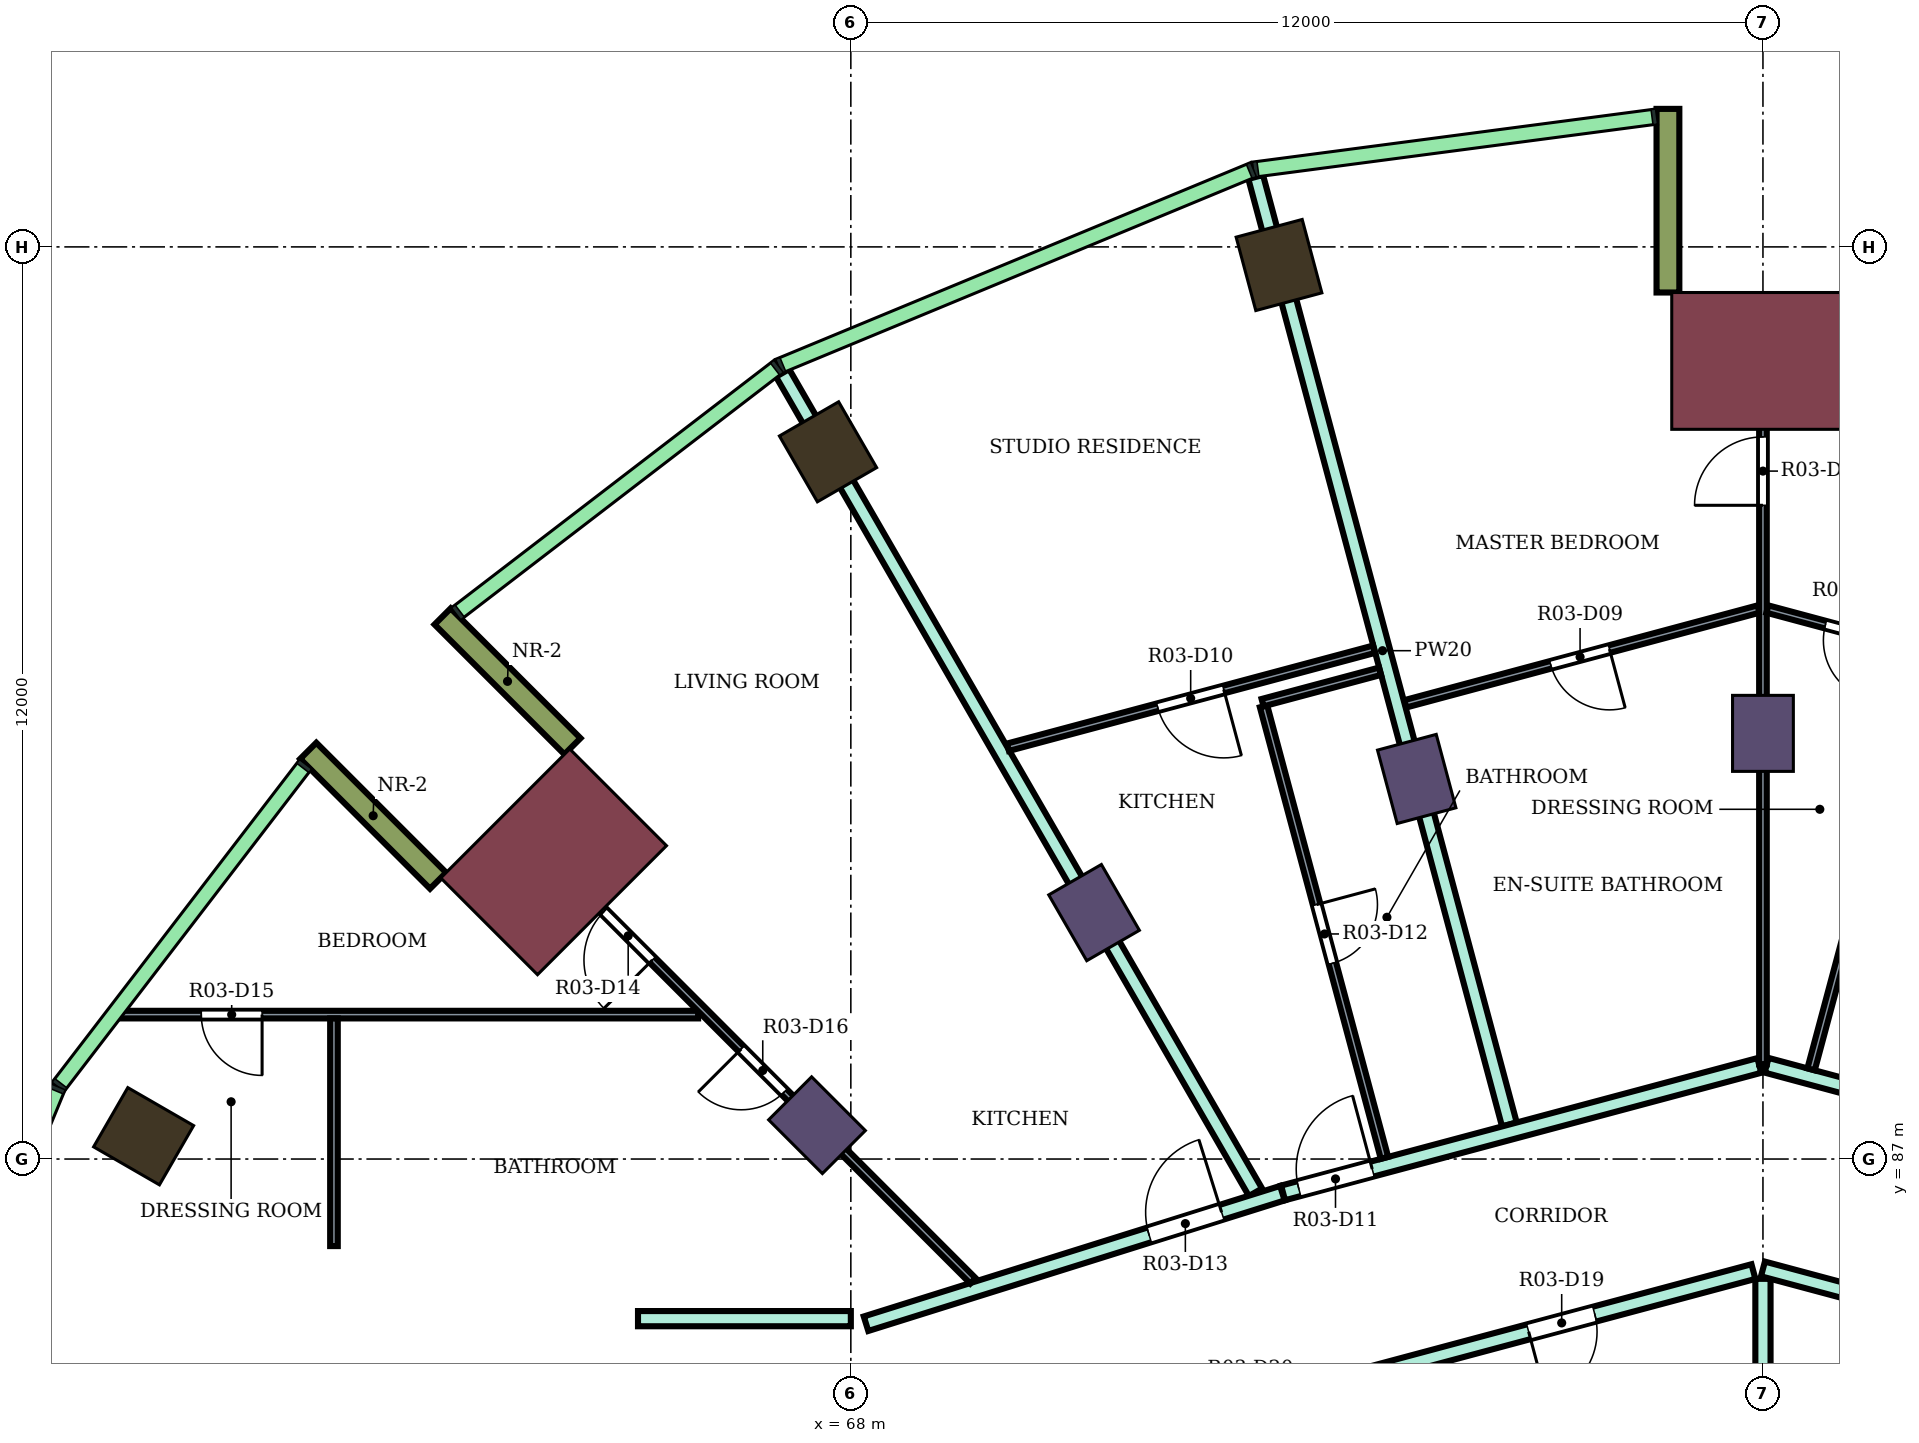
"""IFC4 building model, lengths in metres.
Left out: names, types, materials, properties, quantities, classifications, styles, units other than length and angle.
Written with IfcOpenShell. Run it as: python <this file> out.ifc"""

import sys

from ifc_helpers import new_model, si_unit, direction, frame, frame_2d, origin, origin_2d, place, context, subcontext, project, spatial, rectangle, extrude, element, fill, save


model = new_model("IFC4")
c1 = context("Model", 3, precision=1e-05, world=origin(), true_north=direction((0.0, 1.0)))
c2 = subcontext(c1, "Body", "Model", "MODEL_VIEW")
j1 = project(units=[si_unit("LENGTHUNIT", "METRE"), si_unit("PLANEANGLEUNIT", "RADIAN")], contexts=[c1])
p1 = place(None, origin())
s1 = spatial("IfcSite", under=j1, at=p1, CompositionType="ELEMENT")
p2 = place(p1, origin())
s2 = spatial("IfcBuilding", under=s1, at=p2, CompositionType="ELEMENT")
p3 = place(p2, frame((0.0, 0.0, 190.5)))
s3 = spatial("IfcBuildingStorey", under=s2, at=p3, CompositionType="ELEMENT", Elevation=190.5)
for number, where, z_axis, x_axis in (
    (1, (73.633, 98.762, 0.0), (0.0, 0.0, 1.0), (-0.259, 0.966, 0.0)),
    (2, (67.7, 96.304, 0.0), (0.0, 0.0, 1.0), (-0.5, 0.866, 0.0)),
    (3, (58.696, 87.3, 0.0), (0.0, 0.0, 1.0), (-0.866, 0.5, 0.0)),
):
    element("IfcColumn", number, at=place(p3, frame(where, z_axis=z_axis, x_axis=x_axis)), inside=s3, PredefinedType="COLUMN", context=c2, shape_type="SweptSolid", body=[
        extrude(rectangle(XDim=1.0, YDim=0.9, at=origin_2d()), origin(), (0.0, 0.0, 1.0), 4.1),
    ])
for number, where, z_axis, x_axis in (
    (4, (80.0, 92.6, 0.0), (0.0, 0.0, 1.0), (0.0, 1.0, 0.0)),
    (5, (75.445, 92.0, 0.0), (0.0, 0.0, 1.0), (-0.259, 0.966, 0.0)),
    (6, (71.2, 90.242, 0.0), (0.0, 0.0, 1.0), (-0.5, 0.866, 0.0)),
    (7, (67.555, 87.445, 0.0), (0.0, 0.0, 1.0), (-0.707, 0.707, 0.0)),
):
    element("IfcColumn", number, at=place(p3, frame(where, z_axis=z_axis, x_axis=x_axis)), inside=s3, PredefinedType="COLUMN", context=c2, shape_type="SweptSolid", body=[
        extrude(rectangle(XDim=1.0, YDim=0.8, at=origin_2d()), origin(), (0.0, 0.0, 1.0), 4.1),
    ])
for number, where, z_axis, x_axis in (
    (8, (80.0, 97.5, 0.0), (0.0, 0.0, 1.0), (0.0, 1.0, 0.0)),
    (9, (64.09, 90.91, 0.0), (0.0, 0.0, 1.0), (-0.707, 0.707, 0.0)),
):
    element("IfcColumn", number, at=place(p3, frame(where, z_axis=z_axis, x_axis=x_axis)), inside=s3, PredefinedType="COLUMN", context=c2, shape_type="SweptSolid", body=[
        extrude(rectangle(XDim=1.8, YDim=2.4, at=origin_2d()), origin(), (0.0, 0.0, 1.0), 4.1),
    ])
for number, where, z_axis, x_axis in (
    (10, (78.75, 98.4, 0.0), (0.0, 0.0, 1.0), (0.0, 1.0, 0.0)),
    (11, (64.338, 92.43, 0.0), (0.0, 0.0, 1.0), (-0.707, 0.707, 0.0)),
    (12, (62.57, 90.662, 0.0), (0.0, 0.0, 1.0), (-0.707, 0.707, 0.0)),
):
    element("IfcWall", number, at=place(p3, frame(where, z_axis=z_axis, x_axis=x_axis)), inside=s3, PredefinedType="NOTDEFINED", context=c2, shape_type="SweptSolid", body=[
        extrude(rectangle(XDim=2.416, YDim=0.3, at=frame_2d((1.208, 0.0))), origin(), (0.0, 0.0, 1.0), 4.1),
    ])
p4 = place(p3, frame((65.2, 84.9, 0.0), z_axis=(0.0, 0.0, 1.0), x_axis=(1.0, 0.0, 0.0)))
e13 = element("IfcWall", 13, at=p4, inside=s3, PredefinedType="PARTITIONING", context=c2, shape_type="SweptSolid", body=[
    extrude(rectangle(XDim=2.8, YDim=0.2, at=frame_2d((1.4, 0.0))), origin(), (0.0, 0.0, 1.0), 3.65),
])
p5 = place(p3, frame((67.102, 97.342, 0.0), z_axis=(0.0, 0.0, 1.0), x_axis=(0.499940938316, -0.866059500378, 0.0)))
e14 = element("IfcWall", 14, at=p5, inside=s3, PredefinedType="PARTITIONING", context=c2, shape_type="SweptSolid", body=[
    extrude(rectangle(XDim=12.446, YDim=0.2, at=frame_2d((6.223, 0.0))), origin(), (0.0, 0.0, 1.0), 3.65),
])
p6 = place(p3, frame((68.2, 84.833, 0.0), z_axis=(0.0, 0.0, 1.0), x_axis=(0.954204109499, 0.299156342762, 0.0)))
e15 = element("IfcWall", 15, at=p6, inside=s3, PredefinedType="PARTITIONING", context=c2, shape_type="SweptSolid", body=[
    extrude(rectangle(XDim=5.74, YDim=0.2, at=frame_2d((2.87, 0.0))), origin(), (0.0, 0.0, 1.0), 3.65),
])
p7 = place(p6, frame((3.903, 0.0, 0.0)))
e16 = element("IfcOpeningElement", 16, at=p7, cuts=e15, PredefinedType="OPENING", context=c2, shape_type="SweptSolid", body=[
    extrude(rectangle(XDim=1.0, YDim=2.1, at=frame_2d((0.5, 1.05))), frame((0.0, 0.11, 0.0), z_axis=(0.0, -1.0, 0.0), x_axis=(1.0, 0.0, 0.0)), (0.0, 0.0, 1.0), 0.22),
])
p8 = place(p3, frame((73.326, 99.92, 0.0), z_axis=(0.0, 0.0, 1.0), x_axis=(0.258652861824, -0.965970339643, 0.0)))
e17 = element("IfcWall", 17, at=p8, inside=s3, PredefinedType="PARTITIONING", context=c2, shape_type="SweptSolid", body=[
    extrude(rectangle(XDim=12.904, YDim=0.2, at=frame_2d((6.452, 0.0))), origin(), (0.0, 0.0, 1.0), 3.65),
])
p9 = place(p3, frame((73.687, 86.554, 0.0), z_axis=(0.0, 0.0, 1.0), x_axis=(0.965992724769, 0.258569247387, 0.0)))
e18 = element("IfcWall", 18, at=p9, inside=s3, PredefinedType="PARTITIONING", context=c2, shape_type="SweptSolid", body=[
    extrude(rectangle(XDim=6.486, YDim=0.2, at=frame_2d((3.243, 0.0))), origin(), (0.0, 0.0, 1.0), 3.65),
])
p10 = place(p9, frame((0.214, 0.0, 0.0)))
e19 = element("IfcOpeningElement", 19, at=p10, cuts=e18, PredefinedType="OPENING", context=c2, shape_type="SweptSolid", body=[
    extrude(rectangle(XDim=1.0, YDim=2.1, at=frame_2d((0.5, 1.05))), frame((0.0, 0.11, 0.0), z_axis=(0.0, -1.0, 0.0), x_axis=(1.0, 0.0, 0.0)), (0.0, 0.0, 1.0), 0.22),
])
p11 = place(p3, frame((74.413, 84.057, 0.0), z_axis=(0.0, 0.0, 1.0), x_axis=(0.965972135939, 0.258646153246, 0.0)))
e20 = element("IfcWall", 20, at=p11, inside=s3, PredefinedType="PARTITIONING", context=c2, shape_type="SweptSolid", body=[
    extrude(rectangle(XDim=5.654, YDim=0.2, at=frame_2d((2.827, 0.0))), origin(), (0.0, 0.0, 1.0), 3.65),
])
p12 = place(p11, frame((2.593, 0.0, 0.0)))
e21 = element("IfcOpeningElement", 21, at=p12, cuts=e20, PredefinedType="OPENING", context=c2, shape_type="SweptSolid", body=[
    extrude(rectangle(XDim=0.9, YDim=2.1, at=frame_2d((0.45, 1.05))), frame((0.0, 0.11, 0.0), z_axis=(0.0, -1.0, 0.0), x_axis=(1.0, 0.0, 0.0)), (0.0, 0.0, 1.0), 0.22),
])
p13 = place(p3, frame((80.0, 82.699, 0.0), z_axis=(0.0, 0.0, 1.0), x_axis=(0.0, 1.0, 0.0)))
e22 = element("IfcWall", 22, at=p13, inside=s3, PredefinedType="PARTITIONING", context=c2, shape_type="SweptSolid", body=[
    extrude(rectangle(XDim=2.725, YDim=0.2, at=frame_2d((1.363, 0.0))), origin(), (0.0, 0.0, 1.0), 3.65),
])
p14 = place(p3, frame((80.0, 85.554, 0.0), z_axis=(0.0, 0.0, 1.0), x_axis=(0.965928989968, -0.258807237802, 0.0)))
e23 = element("IfcWall", 23, at=p14, inside=s3, PredefinedType="PARTITIONING", context=c2, shape_type="SweptSolid", body=[
    extrude(rectangle(XDim=5.774, YDim=0.2, at=frame_2d((2.887, 0.0))), origin(), (0.0, 0.0, 1.0), 3.65),
])
p15 = place(p14, frame((2.292, 0.0, 0.0)))
e24 = element("IfcOpeningElement", 24, at=p15, cuts=e23, PredefinedType="OPENING", context=c2, shape_type="SweptSolid", body=[
    extrude(rectangle(XDim=0.9, YDim=2.1, at=frame_2d((0.45, 1.05))), frame((0.0, 0.11, 0.0), z_axis=(0.0, -1.0, 0.0), x_axis=(1.0, 0.0, 0.0)), (0.0, 0.0, 1.0), 0.22),
])
p16 = place(p3, frame((80.048, 88.233, 0.0), z_axis=(0.0, 0.0, 1.0), x_axis=(0.965787353661, -0.259335280109, 0.0)))
e25 = element("IfcWall", 25, at=p16, inside=s3, PredefinedType="PARTITIONING", context=c2, shape_type="SweptSolid", body=[
    extrude(rectangle(XDim=6.476, YDim=0.2, at=frame_2d((3.238, 0.0))), origin(), (0.0, 0.0, 1.0), 3.65),
])
p17 = place(p16, frame((4.936, 0.0, 0.0)))
e26 = element("IfcOpeningElement", 26, at=p17, cuts=e25, PredefinedType="OPENING", context=c2, shape_type="SweptSolid", body=[
    extrude(rectangle(XDim=1.0, YDim=2.1, at=frame_2d((0.5, 1.05))), frame((0.0, 0.11, 0.0), z_axis=(0.0, -1.0, 0.0), x_axis=(1.0, 0.0, 0.0)), (0.0, 0.0, 1.0), 0.22),
])
p18 = place(p3, frame((58.379, 88.9, 0.0), z_axis=(0.0, 0.0, 1.0), x_axis=(1.0, 0.0, 0.0)))
e27 = element("IfcWall", 27, at=p18, inside=s3, PredefinedType="PARTITIONING", context=c2, shape_type="SweptSolid", body=[
    extrude(rectangle(XDim=7.612, YDim=0.1, at=frame_2d((3.806, 0.0))), origin(), (0.0, 0.0, 1.0), 3.65),
])
p19 = place(p18, frame((1.075, 0.0, 0.0)))
e28 = element("IfcOpeningElement", 28, at=p19, cuts=e27, PredefinedType="OPENING", context=c2, shape_type="SweptSolid", body=[
    extrude(rectangle(XDim=0.8, YDim=2.1, at=frame_2d((0.4, 1.05))), frame((0.0, 0.06, 0.0), z_axis=(0.0, -1.0, 0.0), x_axis=(1.0, 0.0, 0.0)), (0.0, 0.0, 1.0), 0.12),
])
p20 = place(p3, frame((61.2, 85.855, 0.0), z_axis=(0.0, 0.0, 1.0), x_axis=(0.0, 1.0, 0.0)))
e29 = element("IfcWall", 29, at=p20, inside=s3, PredefinedType="PARTITIONING", context=c2, shape_type="SweptSolid", body=[
    extrude(rectangle(XDim=2.995, YDim=0.1, at=frame_2d((1.498, 0.0))), origin(), (0.0, 0.0, 1.0), 3.65),
])
p21 = place(p3, frame((63.599, 91.409, 0.0), z_axis=(0.0, 0.0, 1.0), x_axis=(0.706920044618, -0.707293468453, 0.0)))
e30 = element("IfcWall", 30, at=p21, inside=s3, PredefinedType="PARTITIONING", context=c2, shape_type="SweptSolid", body=[
    extrude(rectangle(XDim=8.499, YDim=0.1, at=frame_2d((4.25, 0.0))), origin(), (0.0, 0.0, 1.0), 3.65),
])
p22 = place(p21, frame((1.632, 0.0, 0.0)))
e31 = element("IfcOpeningElement", 31, at=p22, cuts=e30, PredefinedType="OPENING", context=c2, shape_type="SweptSolid", body=[
    extrude(rectangle(XDim=0.9, YDim=2.1, at=frame_2d((0.45, 1.05))), frame((0.0, 0.06, 0.0), z_axis=(0.0, -1.0, 0.0), x_axis=(1.0, 0.0, 0.0)), (0.0, 0.0, 1.0), 0.12),
])
p23 = place(p21, frame((4.186, 0.0, 0.0)))
e32 = element("IfcOpeningElement", 32, at=p23, cuts=e30, PredefinedType="OPENING", context=c2, shape_type="SweptSolid", body=[
    extrude(rectangle(XDim=0.8, YDim=2.1, at=frame_2d((0.4, 1.05))), frame((0.0, 0.06, 0.0), z_axis=(0.0, -1.0, 0.0), x_axis=(1.0, 0.0, 0.0)), (0.0, 0.0, 1.0), 0.12),
])
p24 = place(p3, frame((70.067, 92.417, 0.0), z_axis=(0.0, 0.0, 1.0), x_axis=(0.965982566978, 0.258607193045, 0.0)))
e33 = element("IfcWall", 33, at=p24, inside=s3, PredefinedType="PARTITIONING", context=c2, shape_type="SweptSolid", body=[
    extrude(rectangle(XDim=4.987, YDim=0.1, at=frame_2d((2.493, 0.0))), origin(), (0.0, 0.0, 1.0), 3.65),
])
p25 = place(p24, frame((2.038, 0.0, 0.0)))
e34 = element("IfcOpeningElement", 34, at=p25, cuts=e33, PredefinedType="OPENING", context=c2, shape_type="SweptSolid", body=[
    extrude(rectangle(XDim=0.9, YDim=2.1, at=frame_2d((0.45, 1.05))), frame((0.0, 0.06, 0.0), z_axis=(0.0, -1.0, 0.0), x_axis=(1.0, 0.0, 0.0)), (0.0, 0.0, 1.0), 0.12),
])
p26 = place(p3, frame((73.43, 92.956, 0.0), z_axis=(0.0, 0.0, 1.0), x_axis=(0.258707643808, -0.965955669291, 0.0)))
e35 = element("IfcWall", 35, at=p26, inside=s3, PredefinedType="PARTITIONING", context=c2, shape_type="SweptSolid", body=[
    extrude(rectangle(XDim=6.15, YDim=0.1, at=frame_2d((3.075, 0.0))), origin(), (0.0, 0.0, 1.0), 3.65),
])
p27 = place(p26, frame((2.7, 0.0, 0.0)))
e36 = element("IfcOpeningElement", 36, at=p27, cuts=e35, PredefinedType="OPENING", context=c2, shape_type="SweptSolid", body=[
    extrude(rectangle(XDim=0.8, YDim=2.1, at=frame_2d((0.4, 1.05))), frame((0.0, 0.06, 0.0), z_axis=(0.0, -1.0, 0.0), x_axis=(1.0, 0.0, 0.0)), (0.0, 0.0, 1.0), 0.12),
])
p28 = place(p3, frame((73.417, 93.004, 0.0), z_axis=(0.0, 0.0, 1.0), x_axis=(0.966062421459, 0.258308725839, 0.0)))
e37 = element("IfcWall", 37, at=p28, inside=s3, PredefinedType="PARTITIONING", context=c2, shape_type="SweptSolid", body=[
    extrude(rectangle(XDim=1.599, YDim=0.1, at=frame_2d((0.8, 0.0))), origin(), (0.0, 0.0, 1.0), 3.65),
])
p29 = place(p3, frame((75.295, 92.989, 0.0), z_axis=(0.0, 0.0, 1.0), x_axis=(0.965829517501, 0.259178207271, 0.0)))
e38 = element("IfcWall", 38, at=p29, inside=s3, PredefinedType="PARTITIONING", context=c2, shape_type="SweptSolid", body=[
    extrude(rectangle(XDim=4.812, YDim=0.1, at=frame_2d((2.406, 0.0))), origin(), (0.0, 0.0, 1.0), 3.65),
])
p30 = place(p29, frame((1.981, 0.0, 0.0)))
e39 = element("IfcOpeningElement", 39, at=p30, cuts=e38, PredefinedType="OPENING", context=c2, shape_type="SweptSolid", body=[
    extrude(rectangle(XDim=0.8, YDim=2.1, at=frame_2d((0.4, 1.05))), frame((0.0, 0.06, 0.0), z_axis=(0.0, -1.0, 0.0), x_axis=(1.0, 0.0, 0.0)), (0.0, 0.0, 1.0), 0.12),
])
p31 = place(p3, frame((80.0, 88.246, 0.0), z_axis=(0.0, 0.0, 1.0), x_axis=(0.0, 1.0, 0.0)))
e40 = element("IfcWall", 40, at=p31, inside=s3, PredefinedType="PARTITIONING", context=c2, shape_type="SweptSolid", body=[
    extrude(rectangle(XDim=9.954, YDim=0.1, at=frame_2d((4.977, 0.0))), origin(), (0.0, 0.0, 1.0), 3.65),
])
p32 = place(p31, frame((7.354, 0.0, 0.0)))
e41 = element("IfcOpeningElement", 41, at=p32, cuts=e40, PredefinedType="OPENING", context=c2, shape_type="SweptSolid", body=[
    extrude(rectangle(XDim=0.9, YDim=2.1, at=frame_2d((0.45, 1.05))), frame((0.0, 0.06, 0.0), z_axis=(0.0, -1.0, 0.0), x_axis=(1.0, 0.0, 0.0)), (0.0, 0.0, 1.0), 0.12),
])
p33 = place(p3, frame((80.058, 94.235, 0.0), z_axis=(0.0, 0.0, 1.0), x_axis=(0.965831212389, -0.259171891173, 0.0)))
e42 = element("IfcWall", 42, at=p33, inside=s3, PredefinedType="PARTITIONING", context=c2, shape_type="SweptSolid", body=[
    extrude(rectangle(XDim=4.872, YDim=0.1, at=frame_2d((2.436, 0.0))), origin(), (0.0, 0.0, 1.0), 3.65),
])
p34 = place(p33, frame((0.792, 0.0, 0.0)))
e43 = element("IfcOpeningElement", 43, at=p34, cuts=e42, PredefinedType="OPENING", context=c2, shape_type="SweptSolid", body=[
    extrude(rectangle(XDim=0.8, YDim=2.1, at=frame_2d((0.4, 1.05))), frame((0.0, 0.06, 0.0), z_axis=(0.0, -1.0, 0.0), x_axis=(1.0, 0.0, 0.0)), (0.0, 0.0, 1.0), 0.12),
])
p35 = place(p3, frame((80.633, 88.18, 0.0), z_axis=(0.0, 0.0, 1.0), x_axis=(0.25898304477, 0.965881867788, 0.0)))
e44 = element("IfcWall", 44, at=p35, inside=s3, PredefinedType="PARTITIONING", context=c2, shape_type="SweptSolid", body=[
    extrude(rectangle(XDim=5.65, YDim=0.1, at=frame_2d((2.825, 0.0))), origin(), (0.0, 0.0, 1.0), 3.65),
])
p36 = place(p34, frame((0.8, 0.0, 0.0), z_axis=(0.0, 0.0, 1.0), x_axis=(-1.0, 0.0, 0.0)))
e45 = element("IfcDoor", 45, at=p36, inside=s3, OperationType="SINGLE_SWING_LEFT", PredefinedType="DOOR", context=c2, shape_type="SweptSolid", body=[
    extrude(rectangle(XDim=0.8, YDim=2.1, at=frame_2d((0.4, 1.05))), frame((0.0, 0.025, 0.0), z_axis=(0.0, -1.0, 0.0), x_axis=(1.0, 0.0, 0.0)), (0.0, 0.0, 1.0), 0.05),
])
fill(e43, e45)
p37 = place(p32, origin())
e46 = element("IfcDoor", 46, at=p37, inside=s3, OperationType="SINGLE_SWING_LEFT", PredefinedType="DOOR", context=c2, shape_type="SweptSolid", body=[
    extrude(rectangle(XDim=0.9, YDim=2.1, at=frame_2d((0.45, 1.05))), frame((0.0, 0.025, 0.0), z_axis=(0.0, -1.0, 0.0), x_axis=(1.0, 0.0, 0.0)), (0.0, 0.0, 1.0), 0.05),
])
fill(e41, e46)
p38 = place(p30, frame((0.8, 0.0, 0.0), z_axis=(0.0, 0.0, 1.0), x_axis=(-1.0, 0.0, 0.0)))
e47 = element("IfcDoor", 47, at=p38, inside=s3, OperationType="SINGLE_SWING_LEFT", PredefinedType="DOOR", context=c2, shape_type="SweptSolid", body=[
    extrude(rectangle(XDim=0.8, YDim=2.1, at=frame_2d((0.4, 1.05))), frame((0.0, 0.025, 0.0), z_axis=(0.0, -1.0, 0.0), x_axis=(1.0, 0.0, 0.0)), (0.0, 0.0, 1.0), 0.05),
])
fill(e39, e47)
p39 = place(p25, frame((0.9, 0.0, 0.0), z_axis=(0.0, 0.0, 1.0), x_axis=(-1.0, 0.0, 0.0)))
e48 = element("IfcDoor", 48, at=p39, inside=s3, OperationType="SINGLE_SWING_LEFT", PredefinedType="DOOR", context=c2, shape_type="SweptSolid", body=[
    extrude(rectangle(XDim=0.9, YDim=2.1, at=frame_2d((0.45, 1.05))), frame((0.0, 0.025, 0.0), z_axis=(0.0, -1.0, 0.0), x_axis=(1.0, 0.0, 0.0)), (0.0, 0.0, 1.0), 0.05),
])
fill(e34, e48)
p40 = place(p10, origin())
e49 = element("IfcDoor", 49, at=p40, inside=s3, OperationType="SINGLE_SWING_RIGHT", PredefinedType="DOOR", context=c2, shape_type="SweptSolid", body=[
    extrude(rectangle(XDim=1.0, YDim=2.1, at=frame_2d((0.5, 1.05))), frame((0.0, 0.025, 0.0), z_axis=(0.0, -1.0, 0.0), x_axis=(1.0, 0.0, 0.0)), (0.0, 0.0, 1.0), 0.05),
])
fill(e19, e49)
p41 = place(p27, origin())
e50 = element("IfcDoor", 50, at=p41, inside=s3, OperationType="SINGLE_SWING_LEFT", PredefinedType="DOOR", context=c2, shape_type="SweptSolid", body=[
    extrude(rectangle(XDim=0.8, YDim=2.1, at=frame_2d((0.4, 1.05))), frame((0.0, 0.025, 0.0), z_axis=(0.0, -1.0, 0.0), x_axis=(1.0, 0.0, 0.0)), (0.0, 0.0, 1.0), 0.05),
])
fill(e36, e50)
p42 = place(p7, origin())
e51 = element("IfcDoor", 51, at=p42, inside=s3, OperationType="SINGLE_SWING_RIGHT", PredefinedType="DOOR", context=c2, shape_type="SweptSolid", body=[
    extrude(rectangle(XDim=1.0, YDim=2.1, at=frame_2d((0.5, 1.05))), frame((0.0, 0.025, 0.0), z_axis=(0.0, -1.0, 0.0), x_axis=(1.0, 0.0, 0.0)), (0.0, 0.0, 1.0), 0.05),
])
fill(e16, e51)
p43 = place(p22, frame((0.9, 0.0, 0.0), z_axis=(0.0, 0.0, 1.0), x_axis=(-1.0, 0.0, 0.0)))
e52 = element("IfcDoor", 52, at=p43, inside=s3, OperationType="SINGLE_SWING_LEFT", PredefinedType="DOOR", context=c2, shape_type="SweptSolid", body=[
    extrude(rectangle(XDim=0.9, YDim=2.1, at=frame_2d((0.45, 1.05))), frame((0.0, 0.025, 0.0), z_axis=(0.0, -1.0, 0.0), x_axis=(1.0, 0.0, 0.0)), (0.0, 0.0, 1.0), 0.05),
])
fill(e31, e52)
p44 = place(p19, frame((0.8, 0.0, 0.0), z_axis=(0.0, 0.0, 1.0), x_axis=(-1.0, 0.0, 0.0)))
e53 = element("IfcDoor", 53, at=p44, inside=s3, OperationType="SINGLE_SWING_LEFT", PredefinedType="DOOR", context=c2, shape_type="SweptSolid", body=[
    extrude(rectangle(XDim=0.8, YDim=2.1, at=frame_2d((0.4, 1.05))), frame((0.0, 0.025, 0.0), z_axis=(0.0, -1.0, 0.0), x_axis=(1.0, 0.0, 0.0)), (0.0, 0.0, 1.0), 0.05),
])
fill(e28, e53)
p45 = place(p23, frame((0.8, 0.0, 0.0), z_axis=(0.0, 0.0, 1.0), x_axis=(-1.0, 0.0, 0.0)))
e54 = element("IfcDoor", 54, at=p45, inside=s3, OperationType="SINGLE_SWING_RIGHT", PredefinedType="DOOR", context=c2, shape_type="SweptSolid", body=[
    extrude(rectangle(XDim=0.8, YDim=2.1, at=frame_2d((0.4, 1.05))), frame((0.0, 0.025, 0.0), z_axis=(0.0, -1.0, 0.0), x_axis=(1.0, 0.0, 0.0)), (0.0, 0.0, 1.0), 0.05),
])
fill(e32, e54)
p46 = place(p12, frame((0.9, 0.0, 0.0), z_axis=(0.0, 0.0, 1.0), x_axis=(-1.0, 0.0, 0.0)))
e55 = element("IfcDoor", 55, at=p46, inside=s3, OperationType="SINGLE_SWING_RIGHT", PredefinedType="DOOR", context=c2, shape_type="SweptSolid", body=[
    extrude(rectangle(XDim=0.9, YDim=2.1, at=frame_2d((0.45, 1.05))), frame((0.0, 0.025, 0.0), z_axis=(0.0, -1.0, 0.0), x_axis=(1.0, 0.0, 0.0)), (0.0, 0.0, 1.0), 0.05),
])
fill(e21, e55)
save(model, sys.argv[1])
